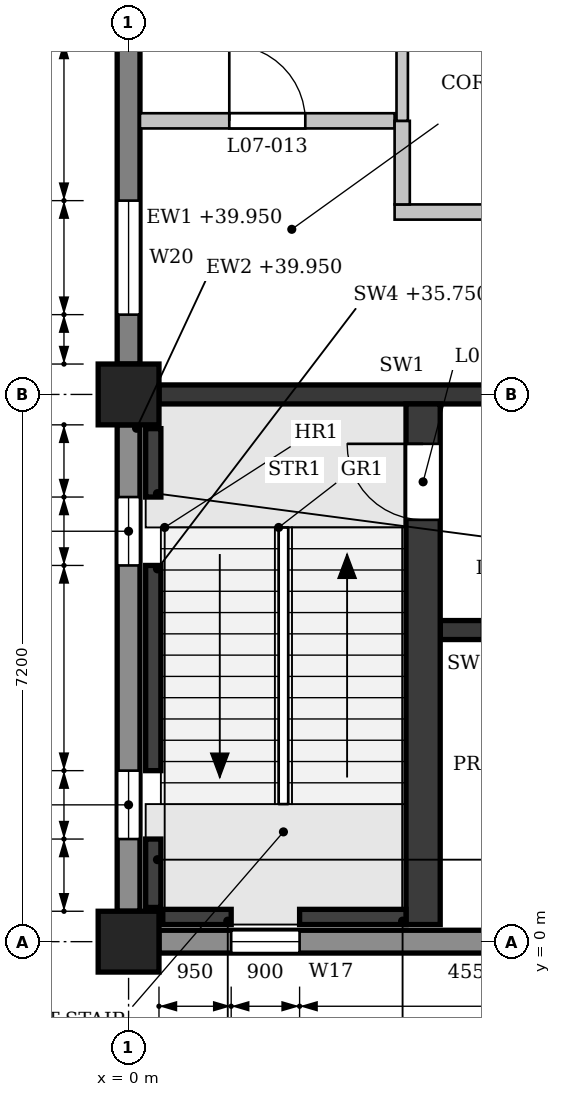
"""IFC4 building model, lengths in metres.
Left out: names, types, materials, properties, quantities, classifications, styles, units other than length and angle.
Written with IfcOpenShell. Run it as: python <this file> out.ifc"""

import sys

from ifc_helpers import new_model, si_unit, direction, frame, frame_2d, origin, origin_2d, place, context, subcontext, project, spatial, polyline, rectangle, outline, extrude, element, fill, save


model = new_model("IFC4")
c1 = context("Model", 3, precision=1e-05, world=origin(), true_north=direction((0.0, 1.0)))
c2 = subcontext(c1, "Body", "Model", "MODEL_VIEW")
j1 = project(units=[si_unit("LENGTHUNIT", "METRE"), si_unit("PLANEANGLEUNIT", "RADIAN")], contexts=[c1])
p1 = place(None, origin())
s1 = spatial("IfcSite", under=j1, at=p1, CompositionType="ELEMENT")
p2 = place(p1, origin())
s2 = spatial("IfcBuilding", under=s1, at=p2, CompositionType="ELEMENT")
p3 = place(p2, frame((0.0, 0.0, 36.0)))
s3 = spatial("IfcBuildingStorey", under=s2, at=p3, CompositionType="ELEMENT", Elevation=36.0)
for number, where, z_axis, x_axis in (
    (1, (0.0, 0.0, 0.0), (0.0, 0.0, 1.0), (1.0, 0.0, 0.0)),
    (2, (0.0, 7.2, 0.0), (0.0, 0.0, 1.0), (1.0, 0.0, 0.0)),
):
    element("IfcColumn", number, at=place(p3, frame(where, z_axis=z_axis, x_axis=x_axis)), inside=s3, PredefinedType="COLUMN", context=c2, shape_type="SweptSolid", body=[
        extrude(rectangle(XDim=0.8, YDim=0.8, at=origin_2d()), origin(), (0.0, 0.0, 1.0), 4.8),
    ])
p4 = place(p3, frame((0.0, 0.4, 0.0), z_axis=(0.0, 0.0, 1.0), x_axis=(0.0, 1.0, 0.0)))
e3 = element("IfcWall", 3, at=p4, inside=s3, PredefinedType="STANDARD", context=c2, shape_type="SweptSolid", body=[
    extrude(rectangle(XDim=6.4, YDim=0.3, at=frame_2d((3.2, 0.0))), origin(), (0.0, 0.0, 1.0), 3.95),
])
p5 = place(p4, frame((0.95, 0.0, 0.9)))
e4 = element("IfcOpeningElement", 4, at=p5, cuts=e3, PredefinedType="OPENING", context=c2, shape_type="SweptSolid", body=[
    extrude(outline(polyline([(0.0, 0.0), (0.9, 0.0), (0.9, 2.55), (0.45, 3.0), (0.0, 2.55), (0.0, 0.0)])), frame((0.0, 0.16, 0.0), z_axis=(0.0, -1.0, 0.0), x_axis=(1.0, 0.0, 0.0)), (0.0, 0.0, 1.0), 0.32),
])
p6 = place(p4, frame((4.55, 0.0, 0.9)))
e5 = element("IfcOpeningElement", 5, at=p6, cuts=e3, PredefinedType="OPENING", context=c2, shape_type="SweptSolid", body=[
    extrude(outline(polyline([(0.0, 0.0), (0.9, 0.0), (0.9, 2.55), (0.45, 3.0), (0.0, 2.55), (0.0, 0.0)])), frame((0.0, 0.16, 0.0), z_axis=(0.0, -1.0, 0.0), x_axis=(1.0, 0.0, 0.0)), (0.0, 0.0, 1.0), 0.32),
])
p7 = place(p3, frame((0.0, 7.6, 0.0), z_axis=(0.0, 0.0, 1.0), x_axis=(0.0, 1.0, 0.0)))
e6 = element("IfcWall", 6, at=p7, inside=s3, PredefinedType="STANDARD", context=c2, shape_type="SweptSolid", body=[
    extrude(rectangle(XDim=6.4, YDim=0.3, at=frame_2d((3.2, 0.0))), origin(), (0.0, 0.0, 1.0), 3.95),
])
p8 = place(p7, frame((0.65, 0.0, 0.9)))
e7 = element("IfcOpeningElement", 7, at=p8, cuts=e6, PredefinedType="OPENING", context=c2, shape_type="SweptSolid", body=[
    extrude(outline(polyline([(0.0, 0.0), (1.5, 0.0), (1.5, 2.25), (0.75, 3.0), (0.0, 2.25), (0.0, 0.0)])), frame((0.0, 0.16, 0.0), z_axis=(0.0, -1.0, 0.0), x_axis=(1.0, 0.0, 0.0)), (0.0, 0.0, 1.0), 0.32),
])
p9 = place(p7, frame((4.25, 0.0, 0.9)))
e8 = element("IfcOpeningElement", 8, at=p9, cuts=e6, PredefinedType="OPENING", context=c2, shape_type="SweptSolid", body=[
    extrude(outline(polyline([(0.0, 0.0), (1.5, 0.0), (1.5, 2.25), (0.75, 3.0), (0.0, 2.25), (0.0, 0.0)])), frame((0.0, 0.16, 0.0), z_axis=(0.0, -1.0, 0.0), x_axis=(1.0, 0.0, 0.0)), (0.0, 0.0, 1.0), 0.32),
])
p10 = place(p3, frame((0.4, 0.0, 0.0), z_axis=(0.0, 0.0, 1.0), x_axis=(1.0, 0.0, 0.0)))
e9 = element("IfcWall", 9, at=p10, inside=s3, PredefinedType="STANDARD", context=c2, shape_type="SweptSolid", body=[
    extrude(rectangle(XDim=6.4, YDim=0.3, at=frame_2d((3.2, 0.0))), origin(), (0.0, 0.0, 1.0), 3.95),
])
p11 = place(p10, frame((0.95, 0.0, 0.9)))
e10 = element("IfcOpeningElement", 10, at=p11, cuts=e9, PredefinedType="OPENING", context=c2, shape_type="SweptSolid", body=[
    extrude(outline(polyline([(0.0, 0.0), (0.9, 0.0), (0.9, 2.55), (0.45, 3.0), (0.0, 2.55), (0.0, 0.0)])), frame((0.0, 0.16, 0.0), z_axis=(0.0, -1.0, 0.0), x_axis=(1.0, 0.0, 0.0)), (0.0, 0.0, 1.0), 0.32),
])
p12 = place(p3, frame((0.4, 7.2, 0.0), z_axis=(0.0, 0.0, 1.0), x_axis=(1.0, 0.0, 0.0)))
e11 = element("IfcWall", 11, at=p12, inside=s3, PredefinedType="SHEAR", context=c2, shape_type="SweptSolid", body=[
    extrude(rectangle(XDim=6.4, YDim=0.25, at=frame_2d((3.2, 0.0))), origin(), (0.0, 0.0, 1.0), 3.85),
])
p13 = place(p12, frame((4.85, 0.0, 0.0)))
e12 = element("IfcOpeningElement", 12, at=p13, cuts=e11, PredefinedType="OPENING", context=c2, shape_type="SweptSolid", body=[
    extrude(rectangle(XDim=1.1, YDim=2.1, at=frame_2d((0.55, 1.05))), frame((0.0, 0.135, 0.0), z_axis=(0.0, -1.0, 0.0), x_axis=(1.0, 0.0, 0.0)), (0.0, 0.0, 1.0), 0.27),
])
p14 = place(p3, frame((0.325, 0.45, -0.25), z_axis=(0.0, 0.0, 1.0), x_axis=(0.0, 1.0, 0.0)))
e13 = element("IfcWall", 13, at=p14, inside=s3, PredefinedType="SHEAR", context=c2, shape_type="SweptSolid", body=[
    extrude(rectangle(XDim=0.9, YDim=0.2, at=frame_2d((0.45, 0.0))), origin(), (0.0, 0.0, 1.0), 4.8),
])
p15 = place(p3, frame((0.325, 2.25, -0.25), z_axis=(0.0, 0.0, 1.0), x_axis=(0.0, 1.0, 0.0)))
e14 = element("IfcWall", 14, at=p15, inside=s3, PredefinedType="SHEAR", context=c2, shape_type="SweptSolid", body=[
    extrude(rectangle(XDim=2.7, YDim=0.2, at=frame_2d((1.35, 0.0))), origin(), (0.0, 0.0, 1.0), 4.8),
])
p16 = place(p3, frame((0.325, 5.85, -0.25), z_axis=(0.0, 0.0, 1.0), x_axis=(0.0, 1.0, 0.0)))
e15 = element("IfcWall", 15, at=p16, inside=s3, PredefinedType="SHEAR", context=c2, shape_type="SweptSolid", body=[
    extrude(rectangle(XDim=0.9, YDim=0.2, at=frame_2d((0.45, 0.0))), origin(), (0.0, 0.0, 1.0), 4.8),
])
p17 = place(p3, frame((0.45, 0.325, -0.25), z_axis=(0.0, 0.0, 1.0), x_axis=(1.0, 0.0, 0.0)))
e16 = element("IfcWall", 16, at=p17, inside=s3, PredefinedType="SHEAR", context=c2, shape_type="SweptSolid", body=[
    extrude(rectangle(XDim=0.9, YDim=0.2, at=frame_2d((0.45, 0.0))), origin(), (0.0, 0.0, 1.0), 4.8),
])
p18 = place(p3, frame((2.25, 0.325, -0.25), z_axis=(0.0, 0.0, 1.0), x_axis=(1.0, 0.0, 0.0)))
e17 = element("IfcWall", 17, at=p18, inside=s3, PredefinedType="SHEAR", context=c2, shape_type="SweptSolid", body=[
    extrude(rectangle(XDim=1.4, YDim=0.2, at=frame_2d((0.7, 0.0))), origin(), (0.0, 0.0, 1.0), 4.8),
])
p19 = place(p3, frame((3.875, 0.225, 0.0), z_axis=(0.0, 0.0, 1.0), x_axis=(0.0, 1.0, 0.0)))
e18 = element("IfcWall", 18, at=p19, inside=s3, PredefinedType="SHEAR", context=c2, shape_type="SweptSolid", body=[
    extrude(rectangle(XDim=6.85, YDim=0.45, at=frame_2d((3.425, 0.0))), origin(), (0.0, 0.0, 1.0), 4.55),
])
p20 = place(p19, frame((5.325, 0.0, 0.0)))
e19 = element("IfcOpeningElement", 19, at=p20, cuts=e18, PredefinedType="OPENING", context=c2, shape_type="SweptSolid", body=[
    extrude(rectangle(XDim=1.0, YDim=2.1, at=frame_2d((0.5, 1.05))), frame((0.0, 0.235, 0.0), z_axis=(0.0, -1.0, 0.0), x_axis=(1.0, 0.0, 0.0)), (0.0, 0.0, 1.0), 0.47),
])
p21 = place(p3, frame((4.1, 4.1, 0.0), z_axis=(0.0, 0.0, 1.0), x_axis=(1.0, 0.0, 0.0)))
e20 = element("IfcWall", 20, at=p21, inside=s3, PredefinedType="SHEAR", context=c2, shape_type="SweptSolid", body=[
    extrude(rectangle(XDim=2.975, YDim=0.25, at=frame_2d((1.487, 0.0))), origin(), (0.0, 0.0, 1.0), 4.55),
])
p22 = place(p21, frame((0.55, 0.0, 0.0)))
e21 = element("IfcOpeningElement", 21, at=p22, cuts=e20, PredefinedType="OPENING", context=c2, shape_type="SweptSolid", body=[
    extrude(rectangle(XDim=0.9, YDim=2.1, at=frame_2d((0.45, 1.05))), frame((0.0, 0.135, 0.0), z_axis=(0.0, -1.0, 0.0), x_axis=(1.0, 0.0, 0.0)), (0.0, 0.0, 1.0), 0.27),
])
p23 = place(p3, frame((3.5, 9.6, 0.0), z_axis=(0.0, 0.0, 1.0), x_axis=(1.0, 0.0, 0.0)))
e22 = element("IfcWall", 22, at=p23, inside=s3, PredefinedType="PARTITIONING", context=c2, shape_type="SweptSolid", body=[
    extrude(outline(polyline([(0.0, 0.0), (14.6, 0.0), (14.6, 4.55), (11.125, 4.55), (11.125, 3.85), (10.675, 3.85), (10.675, 4.55), (3.925, 4.55), (3.925, 3.85), (3.475, 3.85), (3.475, 4.55), (0.0, 4.55), (0.0, 0.0)])), frame((0.0, 0.1, 0.0), z_axis=(0.0, -1.0, 0.0), x_axis=(1.0, 0.0, 0.0)), (0.0, 0.0, 1.0), 0.2),
])
p24 = place(p23, frame((1.4, 0.0, 0.0)))
e23 = element("IfcOpeningElement", 23, at=p24, cuts=e22, PredefinedType="OPENING", context=c2, shape_type="SweptSolid", body=[
    extrude(rectangle(XDim=1.0, YDim=2.1, at=frame_2d((0.5, 1.05))), frame((0.0, 0.11, 0.0), z_axis=(0.0, -1.0, 0.0), x_axis=(1.0, 0.0, 0.0)), (0.0, 0.0, 1.0), 0.22),
])
p25 = place(p23, frame((5.0, 0.0, 0.0)))
e24 = element("IfcOpeningElement", 24, at=p25, cuts=e22, PredefinedType="OPENING", context=c2, shape_type="SweptSolid", body=[
    extrude(rectangle(XDim=1.0, YDim=2.1, at=frame_2d((0.5, 1.05))), frame((0.0, 0.11, 0.0), z_axis=(0.0, -1.0, 0.0), x_axis=(1.0, 0.0, 0.0)), (0.0, 0.0, 1.0), 0.22),
])
p26 = place(p23, frame((10.4, 0.0, 0.0)))
e25 = element("IfcOpeningElement", 25, at=p26, cuts=e22, PredefinedType="OPENING", context=c2, shape_type="SweptSolid", body=[
    extrude(rectangle(XDim=1.0, YDim=2.1, at=frame_2d((0.5, 1.05))), frame((0.0, 0.11, 0.0), z_axis=(0.0, -1.0, 0.0), x_axis=(1.0, 0.0, 0.0)), (0.0, 0.0, 1.0), 0.22),
])
p27 = place(p3, frame((0.15, 10.8, 0.0), z_axis=(0.0, 0.0, 1.0), x_axis=(1.0, 0.0, 0.0)))
e26 = element("IfcWall", 26, at=p27, inside=s3, PredefinedType="PARTITIONING", context=c2, shape_type="SweptSolid", body=[
    extrude(outline(polyline([(0.0, 0.0), (3.35, 0.0), (3.35, 4.55), (0.05, 4.55), (0.05, 3.95), (0.0, 3.95), (0.0, 0.0)])), frame((0.0, 0.1, 0.0), z_axis=(0.0, -1.0, 0.0), x_axis=(1.0, 0.0, 0.0)), (0.0, 0.0, 1.0), 0.2),
])
p28 = place(p27, frame((1.175, 0.0, 0.0)))
e27 = element("IfcOpeningElement", 27, at=p28, cuts=e26, PredefinedType="OPENING", context=c2, shape_type="SweptSolid", body=[
    extrude(rectangle(XDim=1.0, YDim=2.1, at=frame_2d((0.5, 1.05))), frame((0.0, 0.11, 0.0), z_axis=(0.0, -1.0, 0.0), x_axis=(1.0, 0.0, 0.0)), (0.0, 0.0, 1.0), 0.22),
])
p29 = place(p3, frame((3.6, 9.7, 0.0), z_axis=(0.0, 0.0, 1.0), x_axis=(0.0, 1.0, 0.0)))
e28 = element("IfcWall", 28, at=p29, inside=s3, PredefinedType="PARTITIONING", context=c2, shape_type="SweptSolid", body=[
    extrude(rectangle(XDim=1.1, YDim=0.2, at=frame_2d((0.55, 0.0))), origin(), (0.0, 0.0, 1.0), 4.55),
])
p30 = place(p3, frame((3.6, 10.8, 0.0), z_axis=(0.0, 0.0, 1.0), x_axis=(0.0, 1.0, 0.0)))
e29 = element("IfcWall", 29, at=p30, inside=s3, PredefinedType="PARTITIONING", context=c2, shape_type="SweptSolid", body=[
    extrude(rectangle(XDim=10.65, YDim=0.15, at=frame_2d((5.325, 0.0))), origin(), (0.0, 0.0, 1.0), 3.85),
])
p31 = place(p11, origin())
e30 = element("IfcWindow", 30, at=p31, inside=s3, PartitioningType="SINGLE_PANEL", PredefinedType="WINDOW", context=c2, shape_type="SweptSolid", body=[
    extrude(outline(polyline([(0.0, 0.0), (0.9, 0.0), (0.9, 2.55), (0.45, 3.0), (0.0, 2.55), (0.0, 0.0)])), frame((0.0, 0.03, 0.0), z_axis=(0.0, -1.0, 0.0), x_axis=(1.0, 0.0, 0.0)), (0.0, 0.0, 1.0), 0.06),
])
fill(e10, e30)
p32 = place(p5, origin())
e31 = element("IfcWindow", 31, at=p32, inside=s3, PartitioningType="SINGLE_PANEL", PredefinedType="WINDOW", context=c2, shape_type="SweptSolid", body=[
    extrude(outline(polyline([(0.0, 0.0), (0.9, 0.0), (0.9, 2.55), (0.45, 3.0), (0.0, 2.55), (0.0, 0.0)])), frame((0.0, 0.03, 0.0), z_axis=(0.0, -1.0, 0.0), x_axis=(1.0, 0.0, 0.0)), (0.0, 0.0, 1.0), 0.06),
])
fill(e4, e31)
p33 = place(p6, origin())
e32 = element("IfcWindow", 32, at=p33, inside=s3, PartitioningType="SINGLE_PANEL", PredefinedType="WINDOW", context=c2, shape_type="SweptSolid", body=[
    extrude(outline(polyline([(0.0, 0.0), (0.9, 0.0), (0.9, 2.55), (0.45, 3.0), (0.0, 2.55), (0.0, 0.0)])), frame((0.0, 0.03, 0.0), z_axis=(0.0, -1.0, 0.0), x_axis=(1.0, 0.0, 0.0)), (0.0, 0.0, 1.0), 0.06),
])
fill(e5, e32)
p34 = place(p8, origin())
e33 = element("IfcWindow", 33, at=p34, inside=s3, PartitioningType="SINGLE_PANEL", PredefinedType="WINDOW", context=c2, shape_type="SweptSolid", body=[
    extrude(outline(polyline([(0.0, 0.0), (1.5, 0.0), (1.5, 2.25), (0.75, 3.0), (0.0, 2.25), (0.0, 0.0)])), frame((0.0, 0.03, 0.0), z_axis=(0.0, -1.0, 0.0), x_axis=(1.0, 0.0, 0.0)), (0.0, 0.0, 1.0), 0.06),
])
fill(e7, e33)
p35 = place(p20, origin())
e34 = element("IfcDoor", 34, at=p35, inside=s3, OperationType="SINGLE_SWING_RIGHT", PredefinedType="DOOR", context=c2, shape_type="SweptSolid", body=[
    extrude(rectangle(XDim=1.0, YDim=2.1, at=frame_2d((0.5, 1.05))), frame((0.0, 0.025, 0.0), z_axis=(0.0, -1.0, 0.0), x_axis=(1.0, 0.0, 0.0)), (0.0, 0.0, 1.0), 0.05),
])
fill(e19, e34)
p36 = place(p28, origin())
e35 = element("IfcDoor", 35, at=p36, inside=s3, OperationType="SINGLE_SWING_LEFT", PredefinedType="DOOR", context=c2, shape_type="SweptSolid", body=[
    extrude(rectangle(XDim=1.0, YDim=2.1, at=frame_2d((0.5, 1.05))), frame((0.0, 0.025, 0.0), z_axis=(0.0, -1.0, 0.0), x_axis=(1.0, 0.0, 0.0)), (0.0, 0.0, 1.0), 0.05),
])
fill(e27, e35)
save(model, sys.argv[1])
